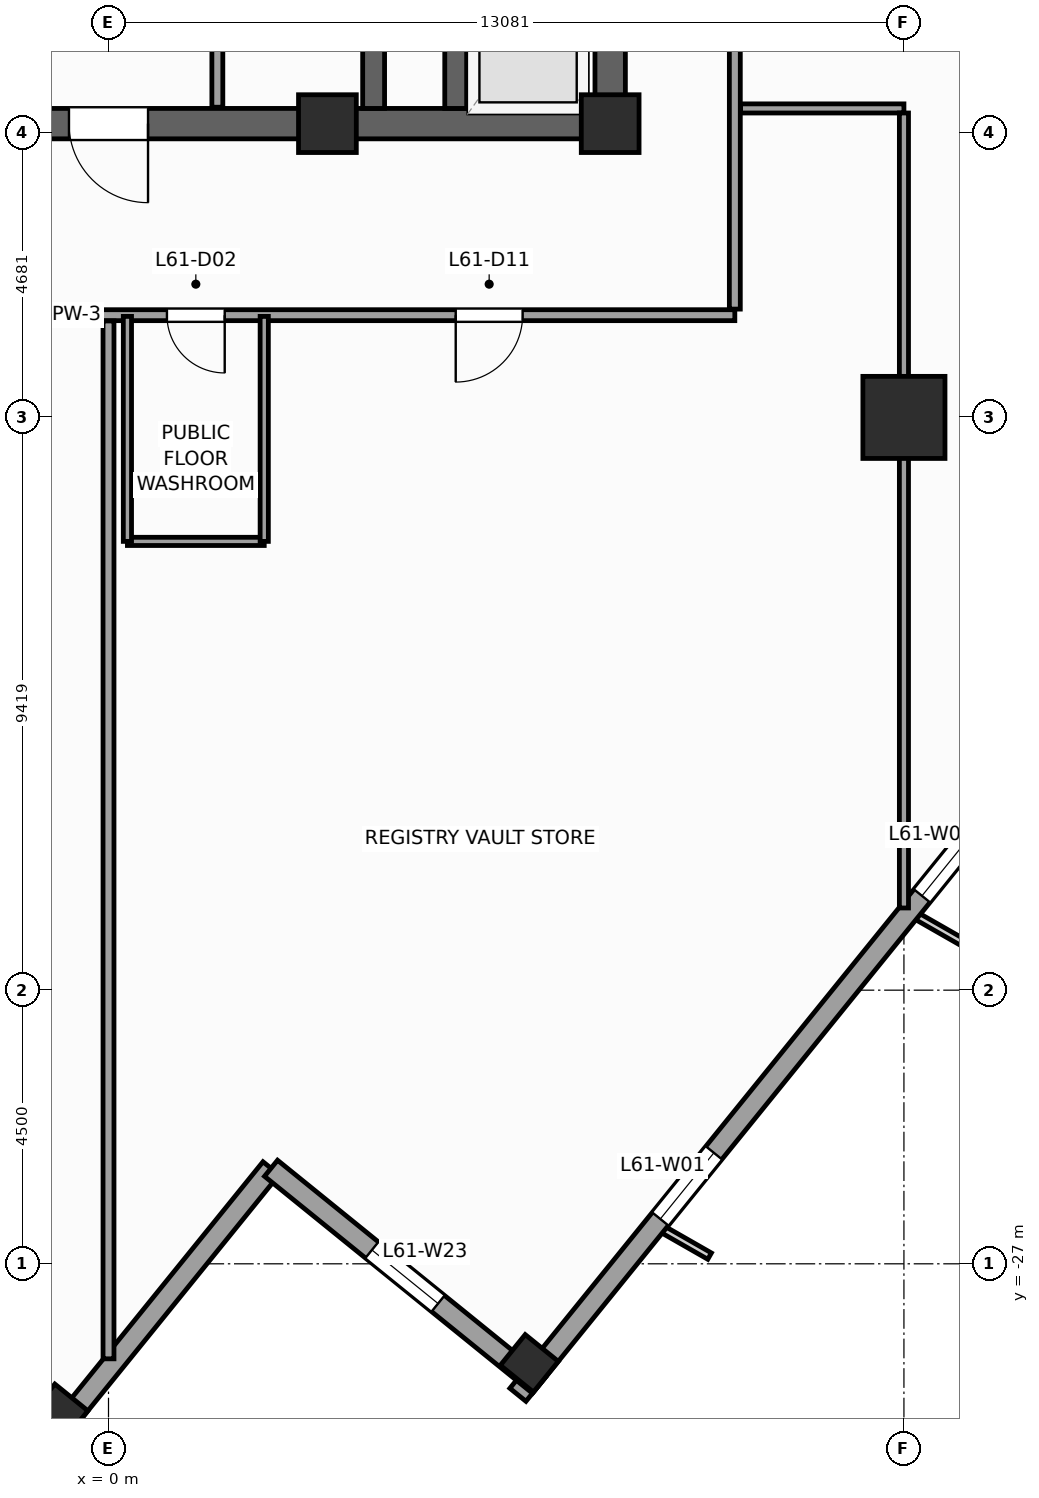
"""IFC4 building model, lengths in metres.
Left out: names, types, materials, properties, quantities, classifications, styles, units other than length and angle.
Written with IfcOpenShell. Run it as: python <this file> out.ifc"""

import sys

from ifc_helpers import new_model, si_unit, direction, frame, frame_2d, origin, origin_2d, place, context, subcontext, project, spatial, rectangle, extrude, source, transform, mapped, element, fill, save


model = new_model("IFC4")
c1 = context("Model", 3, precision=1e-05, world=origin(), true_north=direction((0.0, 1.0)))
c2 = subcontext(c1, "Body", "Model", "MODEL_VIEW")
j1 = project(units=[si_unit("LENGTHUNIT", "METRE"), si_unit("PLANEANGLEUNIT", "RADIAN")], contexts=[c1])
p1 = place(None, origin())
s1 = spatial("IfcSite", under=j1, at=p1, CompositionType="ELEMENT")
p2 = place(p1, origin())
s2 = spatial("IfcBuilding", under=s1, at=p2, CompositionType="ELEMENT")
p3 = place(p2, frame((0.0, 0.0, 252.4)))
s3 = spatial("IfcBuildingStorey", under=s2, at=p3, CompositionType="ELEMENT", Elevation=252.4)
p4 = place(p3, frame((-8.5, -8.25, 0.0), z_axis=(0.0, 0.0, 1.0), x_axis=(1.0, 0.0, 0.0)))
e1 = element("IfcWall", 1, at=p4, inside=s3, PredefinedType="SHEAR", context=c2, shape_type="SweptSolid", body=[
    extrude(rectangle(XDim=17.0, YDim=0.5, at=frame_2d((8.5, 0.0))), origin(), (0.0, 0.0, 1.0), 3.9),
])
p5 = place(p4, frame((7.85, 0.0, 0.0)))
e2 = element("IfcOpeningElement", 2, at=p5, cuts=e1, PredefinedType="OPENING", context=c2, shape_type="SweptSolid", body=[
    extrude(rectangle(XDim=1.3, YDim=2.2, at=frame_2d((0.65, 1.1))), frame((0.0, 0.26, 0.0), z_axis=(0.0, -1.0, 0.0), x_axis=(1.0, 0.0, 0.0)), (0.0, 0.0, 1.0), 0.52),
])
p6 = place(p3, frame((8.25, -8.0, 0.0), z_axis=(0.0, 0.0, 1.0), x_axis=(0.0, 1.0, 0.0)))
e3 = element("IfcWall", 3, at=p6, inside=s3, PredefinedType="SHEAR", context=c2, shape_type="SweptSolid", body=[
    extrude(rectangle(XDim=16.0, YDim=0.5, at=frame_2d((8.0, 0.0))), origin(), (0.0, 0.0, 1.0), 3.9),
])
p7 = place(p6, frame((4.69, 0.0, 0.0)))
e4 = element("IfcOpeningElement", 4, at=p7, cuts=e3, PredefinedType="OPENING", context=c2, shape_type="SweptSolid", body=[
    extrude(rectangle(XDim=1.3, YDim=2.2, at=frame_2d((0.65, 1.1))), frame((0.0, 0.26, 0.0), z_axis=(0.0, -1.0, 0.0), x_axis=(1.0, 0.0, 0.0)), (0.0, 0.0, 1.0), 0.52),
])
p8 = place(p3, frame((4.36, -8.0, 0.0), z_axis=(0.0, 0.0, 1.0), x_axis=(0.0, 1.0, 0.0)))
e5 = element("IfcWall", 5, at=p8, inside=s3, PredefinedType="SHEAR", context=c2, shape_type="SweptSolid", body=[
    extrude(rectangle(XDim=16.0, YDim=0.36, at=frame_2d((8.0, 0.0))), origin(), (0.0, 0.0, 1.0), 3.9),
])
p9 = place(p3, frame((5.71, -8.0, 0.0), z_axis=(0.0, 0.0, 1.0), x_axis=(0.0, 1.0, 0.0)))
e6 = element("IfcWall", 6, at=p9, inside=s3, PredefinedType="SHEAR", context=c2, shape_type="SweptSolid", body=[
    extrude(rectangle(XDim=2.54, YDim=0.36, at=frame_2d((1.27, 0.0))), origin(), (0.0, 0.0, 1.0), 3.9),
])
m1 = source(origin(), c2, "Body", "SweptSolid", [
    extrude(rectangle(XDim=0.95, YDim=0.95, at=origin_2d()), origin(), (0.0, 0.0, 1.0), 3.9),
])
for number, where, z_axis, x_axis in (
    (7, (8.25, -8.25, 0.0), (0.0, 0.0, 1.0), (1.0, 0.0, 0.0)),
    (8, (3.6, -8.25, 0.0), (0.0, 0.0, 1.0), (1.0, 0.0, 0.0)),
):
    element("IfcColumn", number, at=place(p3, frame(where, z_axis=z_axis, x_axis=x_axis)), inside=s3, PredefinedType="PILASTER", context=c2, shape_type="MappedRepresentation", body=[
        mapped(m1, transform((0.0, 0.0, 0.0), scale=1.0)),
    ])
m2 = source(origin(), c2, "Body", "SweptSolid", [
    extrude(rectangle(XDim=1.35, YDim=1.35, at=origin_2d()), origin(), (0.0, 0.0, 1.0), 3.9),
])
p10 = place(p3, frame((13.081, -13.081, 0.0), z_axis=(0.0, 0.0, 1.0), x_axis=(1.0, 0.0, 0.0)))
e9 = element("IfcColumn", 9, at=p10, inside=s3, PredefinedType="COLUMN", context=c2, shape_type="MappedRepresentation", body=[
    mapped(m2, transform((0.0, 0.0, 0.0), scale=1.0)),
])
m3 = source(origin(), c2, "Body", "SweptSolid", [
    extrude(rectangle(XDim=0.65, YDim=0.7, at=origin_2d()), origin(), (0.0, 0.0, 1.0), 3.9),
])
for number, where, z_axis, x_axis in (
    (10, (6.92, -28.637, 0.0), (0.0, 0.0, 1.0), (0.629, 0.777, 0.0)),
    (11, (-0.815, -29.45, 0.0), (0.0, 0.0, 1.0), (0.629, 0.777, 0.0)),
):
    element("IfcColumn", number, at=place(p3, frame(where, z_axis=z_axis, x_axis=x_axis)), inside=s3, PredefinedType="COLUMN", context=c2, shape_type="MappedRepresentation", body=[
        mapped(m3, transform((0.0, 0.0, 0.0), scale=1.0)),
    ])
p11 = place(p3, frame((6.733, -29.154, 0.0), z_axis=(0.0, 0.0, 1.0), x_axis=(0.629325378072, 0.77714192302, 0.0)))
e12 = element("IfcWall", 12, at=p11, inside=s3, PredefinedType="STANDARD", context=c2, shape_type="SweptSolid", body=[
    extrude(rectangle(XDim=36.84, YDim=0.34, at=frame_2d((18.42, 0.0))), origin(), (0.0, 0.0, 1.0), 2.96),
])
p12 = place(p11, frame((3.721, 0.0, 0.48)))
e13 = element("IfcOpeningElement", 13, at=p12, cuts=e12, PredefinedType="OPENING", context=c2, shape_type="SweptSolid", body=[
    extrude(rectangle(XDim=1.4, YDim=2.4, at=frame_2d((0.7, 1.2))), frame((0.0, 0.18, 0.0), z_axis=(0.0, -1.0, 0.0), x_axis=(1.0, 0.0, 0.0)), (0.0, 0.0, 1.0), 0.36),
])
p13 = place(p11, frame((10.559, 0.0, 0.58)))
e14 = element("IfcOpeningElement", 14, at=p13, cuts=e12, PredefinedType="OPENING", context=c2, shape_type="SweptSolid", body=[
    extrude(rectangle(XDim=1.75, YDim=2.3, at=frame_2d((0.875, 1.15))), frame((0.0, 0.18, 0.0), z_axis=(0.0, -1.0, 0.0), x_axis=(1.0, 0.0, 0.0)), (0.0, 0.0, 1.0), 0.36),
])
p14 = place(p11, frame((16.058, 0.0, 0.58)))
e15 = element("IfcOpeningElement", 15, at=p14, cuts=e12, PredefinedType="OPENING", context=c2, shape_type="SweptSolid", body=[
    extrude(rectangle(XDim=1.75, YDim=2.3, at=frame_2d((0.875, 1.15))), frame((0.0, 0.18, 0.0), z_axis=(0.0, -1.0, 0.0), x_axis=(1.0, 0.0, 0.0)), (0.0, 0.0, 1.0), 0.36),
])
p15 = place(p11, frame((24.176, 0.0, 0.58)))
e16 = element("IfcOpeningElement", 16, at=p15, cuts=e12, PredefinedType="OPENING", context=c2, shape_type="SweptSolid", body=[
    extrude(rectangle(XDim=1.75, YDim=2.3, at=frame_2d((0.875, 1.15))), frame((0.0, 0.18, 0.0), z_axis=(0.0, -1.0, 0.0), x_axis=(1.0, 0.0, 0.0)), (0.0, 0.0, 1.0), 0.36),
])
p16 = place(p11, frame((30.982, 0.0, 0.48)))
e17 = element("IfcOpeningElement", 17, at=p16, cuts=e12, PredefinedType="OPENING", context=c2, shape_type="SweptSolid", body=[
    extrude(rectangle(XDim=1.4, YDim=2.4, at=frame_2d((0.7, 1.2))), frame((0.0, 0.18, 0.0), z_axis=(0.0, -1.0, 0.0), x_axis=(1.0, 0.0, 0.0)), (0.0, 0.0, 1.0), 0.36),
])
p17 = place(p3, frame((-29.154, -6.733, 0.0), z_axis=(0.0, 0.0, 1.0), x_axis=(0.77714192302, -0.629325378072, 0.0)))
e18 = element("IfcWall", 18, at=p17, inside=s3, PredefinedType="STANDARD", context=c2, shape_type="SweptSolid", body=[
    extrude(rectangle(XDim=36.84, YDim=0.34, at=frame_2d((18.42, 0.0))), origin(), (0.0, 0.0, 1.0), 2.96),
])
p18 = place(p17, frame((23.495, 0.0, 0.0)))
e19 = element("IfcOpeningElement", 19, at=p18, cuts=e18, PredefinedType="OPENING", context=c2, shape_type="SweptSolid", body=[
    extrude(rectangle(XDim=1.05, YDim=2.25, at=frame_2d((0.525, 1.125))), frame((0.0, 0.18, 0.0), z_axis=(0.0, -1.0, 0.0), x_axis=(1.0, 0.0, 0.0)), (0.0, 0.0, 1.0), 0.36),
])
p19 = place(p17, frame((3.721, 0.0, 0.48)))
e20 = element("IfcOpeningElement", 20, at=p19, cuts=e18, PredefinedType="OPENING", context=c2, shape_type="SweptSolid", body=[
    extrude(rectangle(XDim=1.4, YDim=2.4, at=frame_2d((0.7, 1.2))), frame((0.0, 0.18, 0.0), z_axis=(0.0, -1.0, 0.0), x_axis=(1.0, 0.0, 0.0)), (0.0, 0.0, 1.0), 0.36),
])
p20 = place(p17, frame((9.809, 0.0, 0.58)))
e21 = element("IfcOpeningElement", 21, at=p20, cuts=e18, PredefinedType="OPENING", context=c2, shape_type="SweptSolid", body=[
    extrude(rectangle(XDim=1.75, YDim=2.3, at=frame_2d((0.875, 1.15))), frame((0.0, 0.18, 0.0), z_axis=(0.0, -1.0, 0.0), x_axis=(1.0, 0.0, 0.0)), (0.0, 0.0, 1.0), 0.36),
])
p21 = place(p17, frame((16.058, 0.0, 0.58)))
e22 = element("IfcOpeningElement", 22, at=p21, cuts=e18, PredefinedType="OPENING", context=c2, shape_type="SweptSolid", body=[
    extrude(rectangle(XDim=1.75, YDim=2.3, at=frame_2d((0.875, 1.15))), frame((0.0, 0.18, 0.0), z_axis=(0.0, -1.0, 0.0), x_axis=(1.0, 0.0, 0.0)), (0.0, 0.0, 1.0), 0.36),
])
p22 = place(p17, frame((25.676, 0.0, 0.58)))
e23 = element("IfcOpeningElement", 23, at=p22, cuts=e18, PredefinedType="OPENING", context=c2, shape_type="SweptSolid", body=[
    extrude(rectangle(XDim=1.75, YDim=2.3, at=frame_2d((0.875, 1.15))), frame((0.0, 0.18, 0.0), z_axis=(0.0, -1.0, 0.0), x_axis=(1.0, 0.0, 0.0)), (0.0, 0.0, 1.0), 0.36),
])
p23 = place(p17, frame((30.982, 0.0, 0.48)))
e24 = element("IfcOpeningElement", 24, at=p23, cuts=e18, PredefinedType="OPENING", context=c2, shape_type="SweptSolid", body=[
    extrude(rectangle(XDim=1.4, YDim=2.4, at=frame_2d((0.7, 1.2))), frame((0.0, 0.18, 0.0), z_axis=(0.0, -1.0, 0.0), x_axis=(1.0, 0.0, 0.0)), (0.0, 0.0, 1.0), 0.36),
])
p24 = place(p3, frame((-0.789, -29.703, 0.0), z_axis=(0.0, 0.0, 1.0), x_axis=(0.629323365087, 0.77714355312, 0.0)))
e25 = element("IfcWall", 25, at=p24, inside=s3, PredefinedType="STANDARD", context=c2, shape_type="SweptSolid", body=[
    extrude(rectangle(XDim=5.5, YDim=0.34, at=frame_2d((2.75, 0.0))), origin(), (0.0, 0.0, 1.0), 3.66),
])
p25 = place(p3, frame((2.673, -25.429, 0.0), z_axis=(0.0, 0.0, 1.0), x_axis=(0.777162640055, -0.629299794138, 0.0)))
e26 = element("IfcWall", 26, at=p25, inside=s3, PredefinedType="STANDARD", context=c2, shape_type="SweptSolid", body=[
    extrude(rectangle(XDim=5.67, YDim=0.34, at=frame_2d((2.835, 0.0))), origin(), (0.0, 0.0, 1.0), 3.66),
])
p26 = place(p25, frame((2.135, 0.0, 0.48)))
e27 = element("IfcOpeningElement", 27, at=p26, cuts=e26, PredefinedType="OPENING", context=c2, shape_type="SweptSolid", body=[
    extrude(rectangle(XDim=1.4, YDim=2.4, at=frame_2d((0.7, 1.2))), frame((0.0, 0.18, 0.0), z_axis=(0.0, -1.0, 0.0), x_axis=(1.0, 0.0, 0.0)), (0.0, 0.0, 1.0), 0.36),
])
p27 = place(p3, frame((1.79, -7.98, 0.0), z_axis=(0.0, 0.0, 1.0), x_axis=(0.0, 1.0, 0.0)))
e28 = element("IfcWall", 28, at=p27, inside=s3, PredefinedType="PARTITIONING", context=c2, shape_type="SweptSolid", body=[
    extrude(rectangle(XDim=12.38, YDim=0.18, at=frame_2d((6.19, 0.0))), origin(), (0.0, 0.0, 1.0), 3.66),
])
p28 = place(p27, frame((8.8, 0.0, 0.0)))
e29 = element("IfcOpeningElement", 29, at=p28, cuts=e28, PredefinedType="OPENING", context=c2, shape_type="SweptSolid", body=[
    extrude(rectangle(XDim=1.1, YDim=2.2, at=frame_2d((0.55, 1.1))), frame((0.0, 0.1, 0.0), z_axis=(0.0, -1.0, 0.0), x_axis=(1.0, 0.0, 0.0)), (0.0, 0.0, 1.0), 0.2),
])
p29 = place(p27, frame((10.86, 0.0, 0.0)))
e30 = element("IfcOpeningElement", 30, at=p29, cuts=e28, PredefinedType="OPENING", context=c2, shape_type="SweptSolid", body=[
    extrude(rectangle(XDim=1.1, YDim=2.2, at=frame_2d((0.55, 1.1))), frame((0.0, 0.1, 0.0), z_axis=(0.0, -1.0, 0.0), x_axis=(1.0, 0.0, 0.0)), (0.0, 0.0, 1.0), 0.2),
])
p30 = place(p27, frame((1.4, 0.0, 0.0)))
e31 = element("IfcOpeningElement", 31, at=p30, cuts=e28, PredefinedType="OPENING", context=c2, shape_type="SweptSolid", body=[
    extrude(rectangle(XDim=1.15, YDim=2.25, at=frame_2d((0.575, 1.125))), frame((0.0, 0.1, 0.0), z_axis=(0.0, -1.0, 0.0), x_axis=(1.0, 0.0, 0.0)), (0.0, 0.0, 1.0), 0.2),
])
p31 = place(p27, frame((5.6, 0.0, 0.0)))
e32 = element("IfcOpeningElement", 32, at=p31, cuts=e28, PredefinedType="OPENING", context=c2, shape_type="SweptSolid", body=[
    extrude(rectangle(XDim=1.15, YDim=2.25, at=frame_2d((0.575, 1.125))), frame((0.0, 0.1, 0.0), z_axis=(0.0, -1.0, 0.0), x_axis=(1.0, 0.0, 0.0)), (0.0, 0.0, 1.0), 0.2),
])
p32 = place(p3, frame((-11.35, -11.4, 0.0), z_axis=(0.0, 0.0, 1.0), x_axis=(1.0, 0.0, 0.0)))
e33 = element("IfcWall", 33, at=p32, inside=s3, PredefinedType="PARTITIONING", context=c2, shape_type="SweptSolid", body=[
    extrude(rectangle(XDim=21.65, YDim=0.18, at=frame_2d((10.825, 0.0))), origin(), (0.0, 0.0, 1.0), 3.66),
])
p33 = place(p32, frame((1.455, 0.0, 0.0)))
e34 = element("IfcOpeningElement", 34, at=p33, cuts=e33, PredefinedType="OPENING", context=c2, shape_type="SweptSolid", body=[
    extrude(rectangle(XDim=0.95, YDim=2.1, at=frame_2d((0.475, 1.05))), frame((0.0, 0.1, 0.0), z_axis=(0.0, -1.0, 0.0), x_axis=(1.0, 0.0, 0.0)), (0.0, 0.0, 1.0), 0.2),
])
p34 = place(p32, frame((12.311, 0.0, 0.0)))
e35 = element("IfcOpeningElement", 35, at=p34, cuts=e33, PredefinedType="OPENING", context=c2, shape_type="SweptSolid", body=[
    extrude(rectangle(XDim=0.95, YDim=2.1, at=frame_2d((0.475, 1.05))), frame((0.0, 0.1, 0.0), z_axis=(0.0, -1.0, 0.0), x_axis=(1.0, 0.0, 0.0)), (0.0, 0.0, 1.0), 0.2),
])
p35 = place(p32, frame((17.06, 0.0, 0.0)))
e36 = element("IfcOpeningElement", 36, at=p35, cuts=e33, PredefinedType="OPENING", context=c2, shape_type="SweptSolid", body=[
    extrude(rectangle(XDim=1.1, YDim=2.2, at=frame_2d((0.55, 1.1))), frame((0.0, 0.1, 0.0), z_axis=(0.0, -1.0, 0.0), x_axis=(1.0, 0.0, 0.0)), (0.0, 0.0, 1.0), 0.2),
])
p36 = place(p32, frame((6.584, 0.0, 0.0)))
e37 = element("IfcOpeningElement", 37, at=p36, cuts=e33, PredefinedType="OPENING", context=c2, shape_type="SweptSolid", body=[
    extrude(rectangle(XDim=1.1, YDim=2.2, at=frame_2d((0.55, 1.1))), frame((0.0, 0.1, 0.0), z_axis=(0.0, -1.0, 0.0), x_axis=(1.0, 0.0, 0.0)), (0.0, 0.0, 1.0), 0.2),
])
p37 = place(p3, frame((10.3, -11.3, 0.0), z_axis=(0.0, 0.0, 1.0), x_axis=(0.0, 1.0, 0.0)))
e38 = element("IfcWall", 38, at=p37, inside=s3, PredefinedType="PARTITIONING", context=c2, shape_type="SweptSolid", body=[
    extrude(rectangle(XDim=23.65, YDim=0.18, at=frame_2d((11.825, 0.0))), origin(), (0.0, 0.0, 1.0), 3.66),
])
p38 = place(p37, frame((14.75, 0.0, 0.0)))
e39 = element("IfcOpeningElement", 39, at=p38, cuts=e38, PredefinedType="OPENING", context=c2, shape_type="SweptSolid", body=[
    extrude(rectangle(XDim=1.1, YDim=2.2, at=frame_2d((0.55, 1.1))), frame((0.0, 0.1, 0.0), z_axis=(0.0, -1.0, 0.0), x_axis=(1.0, 0.0, 0.0)), (0.0, 0.0, 1.0), 0.2),
])
p39 = place(p37, frame((6.75, 0.0, 0.0)))
e40 = element("IfcOpeningElement", 40, at=p39, cuts=e38, PredefinedType="OPENING", context=c2, shape_type="SweptSolid", body=[
    extrude(rectangle(XDim=1.1, YDim=2.2, at=frame_2d((0.55, 1.1))), frame((0.0, 0.1, 0.0), z_axis=(0.0, -1.0, 0.0), x_axis=(1.0, 0.0, 0.0)), (0.0, 0.0, 1.0), 0.2),
])
p40 = place(p3, frame((0.0, -11.495, 0.0), z_axis=(0.0, 0.0, 1.0), x_axis=(0.0, -1.0, 0.0)))
e41 = element("IfcWall", 41, at=p40, inside=s3, PredefinedType="PARTITIONING", context=c2, shape_type="SweptSolid", body=[
    extrude(rectangle(XDim=17.067, YDim=0.18, at=frame_2d((8.534, 0.0))), origin(), (0.0, 0.0, 1.0), 3.66),
])
p41 = place(p3, frame((10.395, -8.0, 0.0), z_axis=(0.0, 0.0, 1.0), x_axis=(1.0, 0.0, 0.0)))
e42 = element("IfcWall", 42, at=p41, inside=s3, PredefinedType="PARTITIONING", context=c2, shape_type="SweptSolid", body=[
    extrude(rectangle(XDim=2.686, YDim=0.15, at=frame_2d((1.343, 0.0))), origin(), (0.0, 0.0, 1.0), 3.66),
])
p42 = place(p3, frame((13.081, -8.075, 0.0), z_axis=(0.0, 0.0, 1.0), x_axis=(0.0, -1.0, 0.0)))
e43 = element("IfcWall", 43, at=p42, inside=s3, PredefinedType="PARTITIONING", context=c2, shape_type="SweptSolid", body=[
    extrude(rectangle(XDim=13.073, YDim=0.15, at=frame_2d((6.537, 0.0))), origin(), (0.0, 0.0, 1.0), 2.76),
])
p43 = place(p3, frame((0.311, -15.12, 0.0), z_axis=(0.0, 0.0, 1.0), x_axis=(1.0, 0.0, 0.0)))
e44 = element("IfcWall", 44, at=p43, inside=s3, PredefinedType="PARTITIONING", context=c2, shape_type="SweptSolid", body=[
    extrude(rectangle(XDim=2.25, YDim=0.135, at=frame_2d((1.125, 0.0))), origin(), (0.0, 0.0, 1.0), 3.66),
])
for number, where, z_axis, x_axis in (
    (45, (2.561, -15.12, 0.0), (0.0, 0.0, 1.0), (0.0, 1.0, 0.0)),
    (46, (0.311, -15.12, 0.0), (0.0, 0.0, 1.0), (0.0, 1.0, 0.0)),
):
    element("IfcWall", number, at=place(p3, frame(where, z_axis=z_axis, x_axis=x_axis)), inside=s3, PredefinedType="PARTITIONING", context=c2, shape_type="SweptSolid", body=[
        extrude(rectangle(XDim=3.7, YDim=0.135, at=frame_2d((1.85, 0.0))), origin(), (0.0, 0.0, 1.0), 3.66),
    ])
m4 = source(origin(), c2, "Body", "SweptSolid", [
    extrude(rectangle(XDim=1.4, YDim=2.4, at=frame_2d((0.7, 1.2))), frame((0.0, 0.03, 0.0), z_axis=(0.0, -1.0, 0.0), x_axis=(1.0, 0.0, 0.0)), (0.0, 0.0, 1.0), 0.06),
])
p44 = place(p12, origin())
e47 = element("IfcWindow", 47, at=p44, inside=s3, PartitioningType="SINGLE_PANEL", PredefinedType="WINDOW", context=c2, shape_type="MappedRepresentation", body=[
    mapped(m4, transform((0.0, 0.0, 0.0), scale=1.0)),
])
fill(e13, e47)
m5 = source(origin(), c2, "Body", "SweptSolid", [
    extrude(rectangle(XDim=1.75, YDim=2.3, at=frame_2d((0.875, 1.15))), frame((0.0, 0.03, 0.0), z_axis=(0.0, -1.0, 0.0), x_axis=(1.0, 0.0, 0.0)), (0.0, 0.0, 1.0), 0.06),
])
p45 = place(p13, origin())
e48 = element("IfcWindow", 48, at=p45, inside=s3, PartitioningType="SINGLE_PANEL", PredefinedType="WINDOW", context=c2, shape_type="MappedRepresentation", body=[
    mapped(m5, transform((0.0, 0.0, 0.0), scale=1.0)),
])
fill(e14, e48)
p46 = place(p26, origin())
e49 = element("IfcWindow", 49, at=p46, inside=s3, PartitioningType="SINGLE_PANEL", PredefinedType="WINDOW", context=c2, shape_type="MappedRepresentation", body=[
    mapped(m4, transform((0.0, 0.0, 0.0), scale=1.0)),
])
fill(e27, e49)
m6 = source(origin(), c2, "Body", "SweptSolid", [
    extrude(rectangle(XDim=1.3, YDim=2.2, at=frame_2d((0.65, 1.1))), frame((0.0, 0.025, 0.0), z_axis=(0.0, -1.0, 0.0), x_axis=(1.0, 0.0, 0.0)), (0.0, 0.0, 1.0), 0.05),
])
p47 = place(p5, frame((1.3, 0.0, 0.0), z_axis=(0.0, 0.0, 1.0), x_axis=(-1.0, 0.0, 0.0)))
e50 = element("IfcDoor", 50, at=p47, inside=s3, OperationType="SINGLE_SWING_RIGHT", PredefinedType="DOOR", context=c2, shape_type="MappedRepresentation", body=[
    mapped(m6, transform((0.0, 0.0, 0.0), scale=1.0)),
])
fill(e2, e50)
m7 = source(origin(), c2, "Body", "SweptSolid", [
    extrude(rectangle(XDim=0.95, YDim=2.1, at=frame_2d((0.475, 1.05))), frame((0.0, 0.025, 0.0), z_axis=(0.0, -1.0, 0.0), x_axis=(1.0, 0.0, 0.0)), (0.0, 0.0, 1.0), 0.05),
])
p48 = place(p34, frame((0.95, 0.0, 0.0), z_axis=(0.0, 0.0, 1.0), x_axis=(-1.0, 0.0, 0.0)))
e51 = element("IfcDoor", 51, at=p48, inside=s3, OperationType="SINGLE_SWING_RIGHT", PredefinedType="DOOR", context=c2, shape_type="MappedRepresentation", body=[
    mapped(m7, transform((0.0, 0.0, 0.0), scale=1.0)),
])
fill(e35, e51)
m8 = source(origin(), c2, "Body", "SweptSolid", [
    extrude(rectangle(XDim=1.1, YDim=2.2, at=frame_2d((0.55, 1.1))), frame((0.0, 0.025, 0.0), z_axis=(0.0, -1.0, 0.0), x_axis=(1.0, 0.0, 0.0)), (0.0, 0.0, 1.0), 0.05),
])
p49 = place(p35, frame((1.1, 0.0, 0.0), z_axis=(0.0, 0.0, 1.0), x_axis=(-1.0, 0.0, 0.0)))
e52 = element("IfcDoor", 52, at=p49, inside=s3, OperationType="SINGLE_SWING_LEFT", PredefinedType="DOOR", context=c2, shape_type="MappedRepresentation", body=[
    mapped(m8, transform((0.0, 0.0, 0.0), scale=1.0)),
])
fill(e36, e52)
save(model, sys.argv[1])
